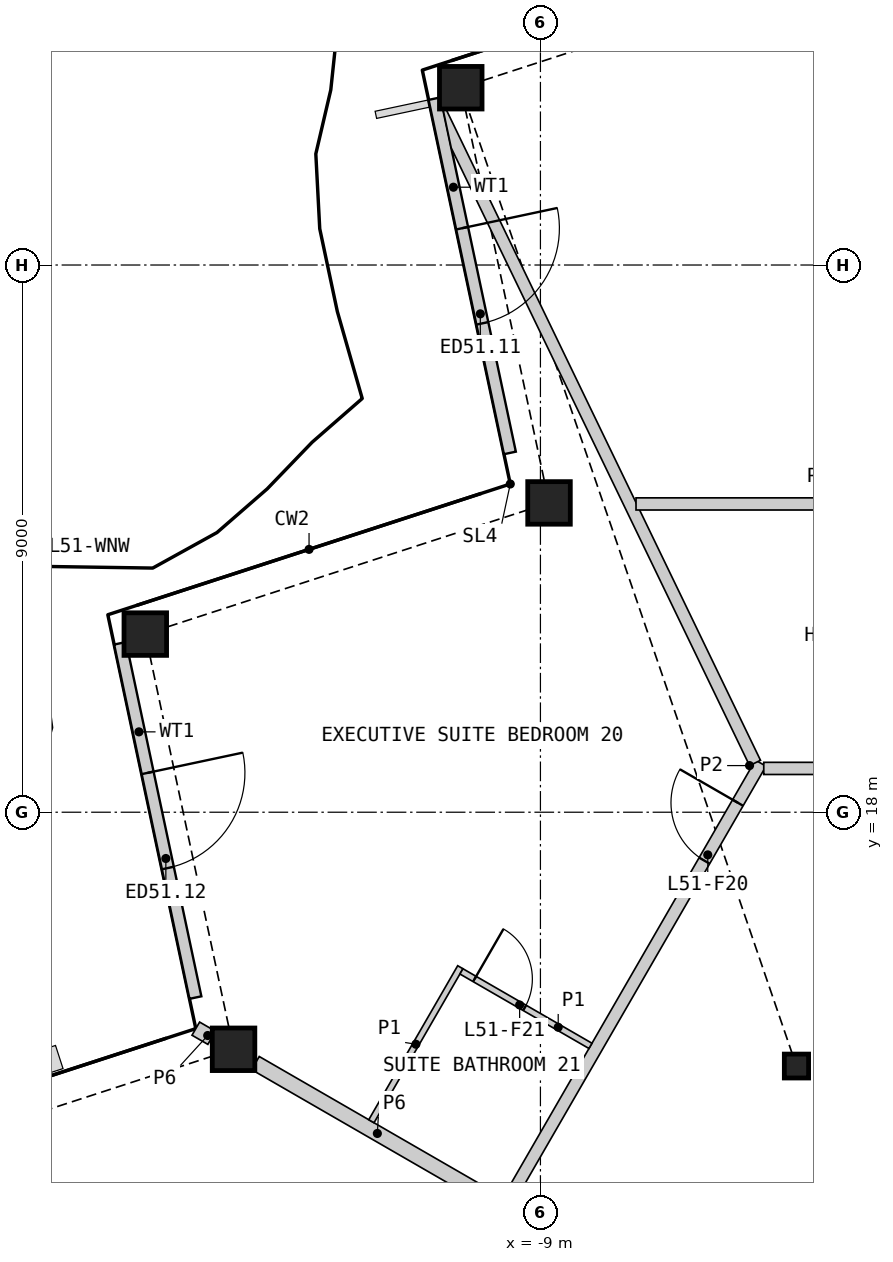
"""IFC4 building model, lengths in metres.
Left out: names, types, materials, properties, quantities, classifications, styles, units other than length and angle.
Written with IfcOpenShell. Run it as: python <this file> out.ifc"""

import sys

from ifc_helpers import new_model, si_unit, direction, frame, frame_2d, origin, origin_2d, place, context, subcontext, project, spatial, polyline, rectangle, hollow_rectangle, i_section, outline, extrude, element, fill, save


model = new_model("IFC4")
c1 = context("Model", 3, precision=1e-05, world=origin(), true_north=direction((0.0, 1.0)))
c2 = subcontext(c1, "Body", "Model", "MODEL_VIEW")
j1 = project(units=[si_unit("LENGTHUNIT", "METRE"), si_unit("PLANEANGLEUNIT", "RADIAN")], contexts=[c1])
p1 = place(None, origin())
s1 = spatial("IfcSite", under=j1, at=p1, CompositionType="ELEMENT")
p2 = place(p1, origin())
s2 = spatial("IfcBuilding", under=s1, at=p2, CompositionType="ELEMENT")
p3 = place(p2, frame((0.0, 0.0, 234.6)))
s3 = spatial("IfcBuildingStorey", under=s2, at=p3, CompositionType="ELEMENT", Elevation=234.6)
for number, where, z_axis, x_axis in (
    (1, (-10.31, 29.916, 0.0), (0.0, 0.0, 1.0), (1.0, 0.0, 0.0)),
    (2, (-8.859, 23.087, 0.0), (0.0, 0.0, 1.0), (1.0, 0.0, 0.0)),
    (3, (-15.499, 20.93, 0.0), (0.0, 0.0, 1.0), (1.0, 0.0, 0.0)),
    (4, (-14.047, 14.101, 0.0), (0.0, 0.0, 1.0), (1.0, 0.0, 0.0)),
):
    element("IfcColumn", number, at=place(p3, frame(where, z_axis=z_axis, x_axis=x_axis)), inside=s3, PredefinedType="COLUMN", context=c2, shape_type="SweptSolid", body=[
        extrude(hollow_rectangle(XDim=0.7, YDim=0.7, WallThickness=0.045, at=origin_2d()), origin(), (0.0, 0.0, 1.0), 3.6),
    ])
p4 = place(p3, frame((-4.789, 13.825, 0.0), z_axis=(0.0, 0.0, 1.0), x_axis=(1.0, 0.0, 0.0)))
e5 = element("IfcColumn", 5, at=p4, inside=s3, PredefinedType="COLUMN", context=c2, shape_type="SweptSolid", body=[
    extrude(i_section(OverallWidth=0.399, OverallDepth=0.393, WebThickness=0.023, FlangeThickness=0.037, at=origin_2d()), origin(), (0.0, 0.0, 1.0), 3.6),
])
p5 = place(p3, frame((-10.741, 29.737, 0.0), z_axis=(0.0, 0.0, 1.0), x_axis=(0.207891593624, -0.978151872308, 0.0)))
e6 = element("IfcWall", 6, at=p5, inside=s3, PredefinedType="SOLIDWALL", context=c2, shape_type="SweptSolid", body=[
    extrude(rectangle(XDim=5.958, YDim=0.2, at=frame_2d((2.979, 0.0))), origin(), (0.0, 0.0, 1.0), 2.701),
])
p6 = place(p5, frame((2.179, 0.0, 0.0)))
e7 = element("IfcOpeningElement", 7, at=p6, cuts=e6, PredefinedType="OPENING", context=c2, shape_type="SweptSolid", body=[
    extrude(rectangle(XDim=1.6, YDim=2.4, at=frame_2d((0.8, 1.2))), frame((0.0, 0.11, 0.0), z_axis=(0.0, -1.0, 0.0), x_axis=(1.0, 0.0, 0.0)), (0.0, 0.0, 1.0), 0.22),
])
p7 = place(p3, frame((-15.913, 20.779, 0.0), z_axis=(0.0, 0.0, 1.0), x_axis=(0.207930802022, -0.978143538327, 0.0)))
e8 = element("IfcWall", 8, at=p7, inside=s3, PredefinedType="SOLIDWALL", context=c2, shape_type="SweptSolid", body=[
    extrude(rectangle(XDim=5.958, YDim=0.2, at=frame_2d((2.979, 0.0))), origin(), (0.0, 0.0, 1.0), 2.701),
])
p8 = place(p7, frame((2.179, 0.0, 0.0)))
e9 = element("IfcOpeningElement", 9, at=p8, cuts=e8, PredefinedType="OPENING", context=c2, shape_type="SweptSolid", body=[
    extrude(rectangle(XDim=1.6, YDim=2.4, at=frame_2d((0.8, 1.2))), frame((0.0, 0.11, 0.0), z_axis=(0.0, -1.0, 0.0), x_axis=(1.0, 0.0, 0.0)), (0.0, 0.0, 1.0), 0.22),
])
p9 = place(p3, frame((-18.976, -4.747, 0.0), z_axis=(0.0, 0.0, 1.0), x_axis=(0.499999852422, 0.866025488988, 0.0)))
e10 = element("IfcWall", 10, at=p9, inside=s3, PredefinedType="PARTITIONING", context=c2, shape_type="SweptSolid", body=[
    extrude(rectangle(XDim=27.198, YDim=0.2, at=frame_2d((13.599, 0.0))), origin(), (0.0, 0.0, 1.0), 3.25),
])
p10 = place(p9, frame((25.346, 0.0, 0.0)))
e11 = element("IfcOpeningElement", 11, at=p10, cuts=e10, PredefinedType="OPENING", context=c2, shape_type="SweptSolid", body=[
    extrude(rectangle(XDim=1.1, YDim=2.1, at=frame_2d((0.55, 1.05))), frame((0.0, 0.11, 0.0), z_axis=(0.0, -1.0, 0.0), x_axis=(1.0, 0.0, 0.0)), (0.0, 0.0, 1.0), 0.22),
])
p11 = place(p9, frame((16.713, 0.0, 0.0)))
e12 = element("IfcOpeningElement", 12, at=p11, cuts=e10, PredefinedType="OPENING", context=c2, shape_type="SweptSolid", body=[
    extrude(rectangle(XDim=1.1, YDim=2.1, at=frame_2d((0.55, 1.05))), frame((0.0, 0.11, 0.0), z_axis=(0.0, -1.0, 0.0), x_axis=(1.0, 0.0, 0.0)), (0.0, 0.0, 1.0), 0.22),
])
p12 = place(p9, frame((0.35, 0.0, 0.0)))
e13 = element("IfcOpeningElement", 13, at=p12, cuts=e10, PredefinedType="OPENING", context=c2, shape_type="SweptSolid", body=[
    extrude(rectangle(XDim=1.1, YDim=2.1, at=frame_2d((0.55, 1.05))), frame((0.0, 0.11, 0.0), z_axis=(0.0, -1.0, 0.0), x_axis=(1.0, 0.0, 0.0)), (0.0, 0.0, 1.0), 0.22),
])
p13 = place(p3, frame((-13.687, 13.874, 0.0), z_axis=(0.0, 0.0, 1.0), x_axis=(0.866034555462, -0.499984148495, 0.0)))
e14 = element("IfcWall", 14, at=p13, inside=s3, PredefinedType="PARTITIONING", context=c2, shape_type="SweptSolid", body=[
    extrude(rectangle(XDim=4.63, YDim=0.25, at=frame_2d((2.315, 0.0))), origin(), (0.0, 0.0, 1.0), 2.404),
])
p14 = place(p3, frame((-5.327, 18.72, 0.0), z_axis=(0.0, 0.0, 1.0), x_axis=(1.0, 0.0, 0.0)))
e15 = element("IfcWall", 15, at=p14, inside=s3, PredefinedType="PARTITIONING", context=c2, shape_type="SweptSolid", body=[
    extrude(rectangle(XDim=3.002, YDim=0.2, at=frame_2d((1.501, 0.0))), origin(), (0.0, 0.0, 1.0), 3.25),
])
p15 = place(p3, frame((-14.668, 14.44, 0.0), z_axis=(0.0, 0.0, 1.0), x_axis=(0.865888485494, -0.500237074485, 0.0)))
e16 = element("IfcWall", 16, at=p15, inside=s3, PredefinedType="PARTITIONING", context=c2, shape_type="SweptSolid", body=[
    extrude(rectangle(XDim=0.301, YDim=0.25, at=frame_2d((0.15, 0.0))), origin(), (0.0, 0.0, 1.0), 2.404),
])
p16 = place(p3, origin())
e17 = element("IfcWall", 17, at=p16, inside=s3, PredefinedType="PARTITIONING", context=c2, shape_type="SweptSolid", body=[
    extrude(outline(polyline([(-5.561, 18.767), (-10.466, 28.923), (-10.64, 29.745), (-5.381, 18.854), (-5.561, 18.767)])), origin(), (0.0, 0.0, 1.0), 2.404),
])
p17 = place(p3, frame((-7.428, 23.071, 0.0), z_axis=(0.0, 0.0, 1.0), x_axis=(1.0, 0.0, 0.0)))
e18 = element("IfcWall", 18, at=p17, inside=s3, PredefinedType="PARTITIONING", context=c2, shape_type="SweptSolid", body=[
    extrude(rectangle(XDim=12.002, YDim=0.2, at=frame_2d((6.001, 0.0))), origin(), (0.0, 0.0, 1.0), 2.404),
])
p18 = place(p17, frame((5.275, 0.0, 0.0)))
e19 = element("IfcOpeningElement", 19, at=p18, cuts=e18, PredefinedType="OPENING", context=c2, shape_type="SweptSolid", body=[
    extrude(rectangle(XDim=0.95, YDim=2.1, at=frame_2d((0.475, 1.05))), frame((0.0, 0.11, 0.0), z_axis=(0.0, -1.0, 0.0), x_axis=(1.0, 0.0, 0.0)), (0.0, 0.0, 1.0), 0.22),
])
p19 = place(p3, frame((-11.78, 12.917, 0.0), z_axis=(0.0, 0.0, 1.0), x_axis=(0.499999433879, 0.866025730634, 0.0)))
e20 = element("IfcWall", 20, at=p19, inside=s3, PredefinedType="PARTITIONING", context=c2, shape_type="SweptSolid", body=[
    extrude(rectangle(XDim=2.925, YDim=0.1, at=frame_2d((1.462, 0.0))), origin(), (0.0, 0.0, 1.0), 2.404),
])
p20 = place(p3, frame((-10.299, 15.382, 0.0), z_axis=(0.0, 0.0, 1.0), x_axis=(0.866057815567, -0.499943856944, 0.0)))
e21 = element("IfcWall", 21, at=p20, inside=s3, PredefinedType="PARTITIONING", context=c2, shape_type="SweptSolid", body=[
    extrude(rectangle(XDim=2.45, YDim=0.1, at=frame_2d((1.225, 0.0))), origin(), (0.0, 0.0, 1.0), 2.404),
])
p21 = place(p20, frame((0.25, 0.0, 0.0)))
e22 = element("IfcOpeningElement", 22, at=p21, cuts=e21, PredefinedType="OPENING", context=c2, shape_type="SweptSolid", body=[
    extrude(rectangle(XDim=0.95, YDim=2.1, at=frame_2d((0.475, 1.05))), frame((0.0, 0.06, 0.0), z_axis=(0.0, -1.0, 0.0), x_axis=(1.0, 0.0, 0.0)), (0.0, 0.0, 1.0), 0.12),
])
p22 = place(p6, origin())
e23 = element("IfcDoor", 23, at=p22, inside=s3, OperationType="DOUBLE_DOOR_SINGLE_SWING", PredefinedType="DOOR", context=c2, shape_type="SweptSolid", body=[
    extrude(rectangle(XDim=1.6, YDim=2.4, at=frame_2d((0.8, 1.2))), frame((0.0, 0.025, 0.0), z_axis=(0.0, -1.0, 0.0), x_axis=(1.0, 0.0, 0.0)), (0.0, 0.0, 1.0), 0.05),
])
fill(e7, e23)
p23 = place(p8, origin())
e24 = element("IfcDoor", 24, at=p23, inside=s3, OperationType="DOUBLE_DOOR_SINGLE_SWING", PredefinedType="DOOR", context=c2, shape_type="SweptSolid", body=[
    extrude(rectangle(XDim=1.6, YDim=2.4, at=frame_2d((0.8, 1.2))), frame((0.0, 0.025, 0.0), z_axis=(0.0, -1.0, 0.0), x_axis=(1.0, 0.0, 0.0)), (0.0, 0.0, 1.0), 0.05),
])
fill(e9, e24)
p24 = place(p10, origin())
e25 = element("IfcDoor", 25, at=p24, inside=s3, OperationType="SINGLE_SWING_RIGHT", PredefinedType="DOOR", context=c2, shape_type="SweptSolid", body=[
    extrude(rectangle(XDim=1.1, YDim=2.1, at=frame_2d((0.55, 1.05))), frame((0.0, 0.025, 0.0), z_axis=(0.0, -1.0, 0.0), x_axis=(1.0, 0.0, 0.0)), (0.0, 0.0, 1.0), 0.05),
])
fill(e11, e25)
p25 = place(p21, origin())
e26 = element("IfcDoor", 26, at=p25, inside=s3, OperationType="SINGLE_SWING_LEFT", PredefinedType="DOOR", context=c2, shape_type="SweptSolid", body=[
    extrude(rectangle(XDim=0.95, YDim=2.1, at=frame_2d((0.475, 1.05))), frame((0.0, 0.025, 0.0), z_axis=(0.0, -1.0, 0.0), x_axis=(1.0, 0.0, 0.0)), (0.0, 0.0, 1.0), 0.05),
])
fill(e22, e26)
save(model, sys.argv[1])
